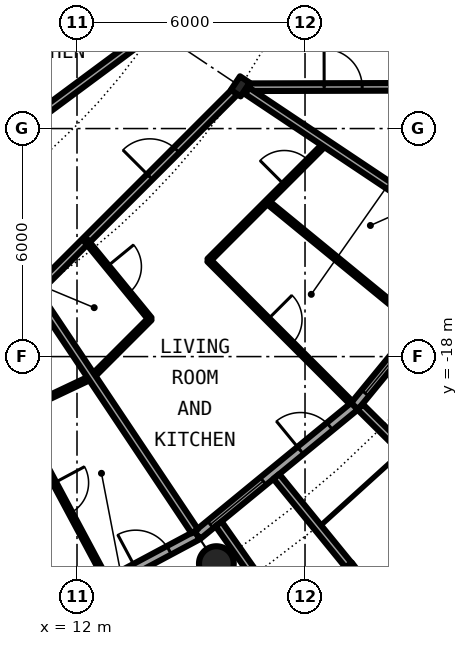
"""IFC4 building model, lengths in metres.
Left out: names, types, materials, properties, quantities, classifications, styles, units other than length and angle.
Written with IfcOpenShell. Run it as: python <this file> out.ifc"""

import sys

from ifc_helpers import new_model, si_unit, direction, frame, frame_2d, origin, origin_2d, place, context, subcontext, project, spatial, rectangle, circle, hollow_circle, i_section, extrude, element, fill, save


model = new_model("IFC4")
c1 = context("Model", 3, precision=1e-05, world=origin(), true_north=direction((0.0, 1.0)))
c2 = subcontext(c1, "Body", "Model", "MODEL_VIEW")
j1 = project(units=[si_unit("LENGTHUNIT", "METRE"), si_unit("PLANEANGLEUNIT", "RADIAN")], contexts=[c1])
p1 = place(None, origin())
s1 = spatial("IfcSite", under=j1, at=p1, CompositionType="ELEMENT")
p2 = place(p1, origin())
s2 = spatial("IfcBuilding", under=s1, at=p2, CompositionType="ELEMENT")
p3 = place(p2, frame((0.0, 0.0, 117.75)))
s3 = spatial("IfcBuildingStorey", under=s2, at=p3, CompositionType="ELEMENT", Elevation=117.75)
p4 = place(p3, frame((15.667, -23.448, 0.0), z_axis=(0.0, 0.0, 1.0), x_axis=(1.0, 0.0, 0.0)))
e1 = element("IfcColumn", 1, at=p4, inside=s3, PredefinedType="COLUMN", context=c2, shape_type="SweptSolid", body=[
    extrude(hollow_circle(Radius=0.457, WallThickness=0.04, at=origin_2d()), origin(), (0.0, 0.0, 1.0), 3.05),
])
p5 = place(p3, frame((16.297, -10.889, 0.0), z_axis=(0.0, 0.0, 1.0), x_axis=(0.831469612303, -0.55557023302, 0.0)))
e2 = element("IfcColumn", 2, at=p5, inside=s3, PredefinedType="COLUMN", context=c2, shape_type="SweptSolid", body=[
    extrude(i_section(OverallWidth=0.307, OverallDepth=0.432, WebThickness=0.021, FlangeThickness=0.04, FilletRadius=0.027, at=origin_2d()), origin(), (0.0, 0.0, 1.0), 3.05),
])
p6 = place(p3, frame((10.447, -25.222, 0.0), z_axis=(0.0, 0.0, 1.0), x_axis=(0.881915646801, 0.471407246368, 0.0)))
e3 = element("IfcWall", 3, at=p6, inside=s3, PredefinedType="SOLIDWALL", context=c2, shape_type="SweptSolid", body=[
    extrude(rectangle(XDim=5.352, YDim=0.25, at=frame_2d((2.676, 0.0))), origin(), (0.0, 0.0, 1.0), 2.7),
])
p7 = place(p6, frame((0.441, 0.0, 0.3)))
e4 = element("IfcOpeningElement", 4, at=p7, cuts=e3, PredefinedType="OPENING", context=c2, shape_type="SweptSolid", body=[
    extrude(rectangle(XDim=1.8, YDim=2.1, at=frame_2d((0.9, 1.05))), frame((0.0, 0.135, 0.0), z_axis=(0.0, -1.0, 0.0), x_axis=(1.0, 0.0, 0.0)), (0.0, 0.0, 1.0), 0.27),
])
p8 = place(p6, frame((3.51, 0.0, 0.0)))
e5 = element("IfcOpeningElement", 5, at=p8, cuts=e3, PredefinedType="OPENING", context=c2, shape_type="SweptSolid", body=[
    extrude(rectangle(XDim=1.0, YDim=2.2, at=frame_2d((0.5, 1.1))), frame((0.0, 0.135, 0.0), z_axis=(0.0, -1.0, 0.0), x_axis=(1.0, 0.0, 0.0)), (0.0, 0.0, 1.0), 0.27),
])
p9 = place(p3, frame((15.167, -22.699, 0.0), z_axis=(0.0, 0.0, 1.0), x_axis=(0.773019449054, 0.634382322723, 0.0)))
e6 = element("IfcWall", 6, at=p9, inside=s3, PredefinedType="SOLIDWALL", context=c2, shape_type="SweptSolid", body=[
    extrude(rectangle(XDim=5.352, YDim=0.25, at=frame_2d((2.676, 0.0))), origin(), (0.0, 0.0, 1.0), 2.7),
])
p10 = place(p9, frame((0.441, 0.0, 0.3)))
e7 = element("IfcOpeningElement", 7, at=p10, cuts=e6, PredefinedType="OPENING", context=c2, shape_type="SweptSolid", body=[
    extrude(rectangle(XDim=1.8, YDim=2.1, at=frame_2d((0.9, 1.05))), frame((0.0, 0.135, 0.0), z_axis=(0.0, -1.0, 0.0), x_axis=(1.0, 0.0, 0.0)), (0.0, 0.0, 1.0), 0.27),
])
p11 = place(p9, frame((3.51, 0.0, 0.0)))
e8 = element("IfcOpeningElement", 8, at=p11, cuts=e6, PredefinedType="OPENING", context=c2, shape_type="SweptSolid", body=[
    extrude(rectangle(XDim=1.0, YDim=2.2, at=frame_2d((0.5, 1.1))), frame((0.0, 0.135, 0.0), z_axis=(0.0, -1.0, 0.0), x_axis=(1.0, 0.0, 0.0)), (0.0, 0.0, 1.0), 0.27),
])
p12 = place(p3, frame((17.382, -24.94, -0.03), z_axis=(0.0, 0.0, 1.0), x_axis=(0.797456837111, 0.603375996329, 0.0)))
e9 = element("IfcWall", 9, at=p12, inside=s3, PredefinedType="SOLIDWALL", context=c2, shape_type="SweptSolid", body=[
    extrude(rectangle(XDim=2.391, YDim=0.2, at=frame_2d((1.196, 0.0))), origin(), (0.0, 0.0, 1.0), 2.73),
])
p13 = place(p12, frame((0.156, 0.0, 0.33)))
e10 = element("IfcOpeningElement", 10, at=p13, cuts=e9, PredefinedType="OPENING", context=c2, shape_type="SweptSolid", body=[
    extrude(circle(Radius=1.04, at=frame_2d((1.04, 1.04))), frame((0.0, 0.11, 0.0), z_axis=(0.0, -1.0, 0.0), x_axis=(1.0, 0.0, 0.0)), (0.0, 0.0, 1.0), 0.22),
])
p14 = place(p3, frame((15.726, -22.402, -0.03), z_axis=(0.0, 0.0, 1.0), x_axis=(0.574826383135, -0.818275399393, 0.0)))
e11 = element("IfcWall", 11, at=p14, inside=s3, PredefinedType="SOLIDWALL", context=c2, shape_type="SweptSolid", body=[
    extrude(rectangle(XDim=2.929, YDim=0.2, at=frame_2d((1.465, 0.0))), origin(), (0.0, 0.0, 1.0), 2.73),
])
p15 = place(p3, frame((17.246, -21.155, -0.03), z_axis=(0.0, 0.0, 1.0), x_axis=(0.631741648902, -0.775179004516, 0.0)))
e12 = element("IfcWall", 12, at=p15, inside=s3, PredefinedType="SOLIDWALL", context=c2, shape_type="SweptSolid", body=[
    extrude(rectangle(XDim=3.006, YDim=0.2, at=frame_2d((1.503, 0.0))), origin(), (0.0, 0.0, 1.0), 2.73),
])
p16 = place(p3, frame((19.304, -19.304, 0.0), z_axis=(0.0, 0.0, 1.0), x_axis=(0.634382322723, 0.773019449054, 0.0)))
e13 = element("IfcWall", 13, at=p16, inside=s3, PredefinedType="SOLIDWALL", context=c2, shape_type="SweptSolid", body=[
    extrude(rectangle(XDim=5.352, YDim=0.25, at=frame_2d((2.676, 0.0))), origin(), (0.0, 0.0, 1.0), 2.7),
])
p17 = place(p16, frame((0.441, 0.0, 0.3)))
e14 = element("IfcOpeningElement", 14, at=p17, cuts=e13, PredefinedType="OPENING", context=c2, shape_type="SweptSolid", body=[
    extrude(rectangle(XDim=1.8, YDim=2.1, at=frame_2d((0.9, 1.05))), frame((0.0, 0.135, 0.0), z_axis=(0.0, -1.0, 0.0), x_axis=(1.0, 0.0, 0.0)), (0.0, 0.0, 1.0), 0.27),
])
p18 = place(p16, frame((3.51, 0.0, 0.0)))
e15 = element("IfcOpeningElement", 15, at=p18, cuts=e13, PredefinedType="OPENING", context=c2, shape_type="SweptSolid", body=[
    extrude(rectangle(XDim=1.0, YDim=2.2, at=frame_2d((0.5, 1.1))), frame((0.0, 0.135, 0.0), z_axis=(0.0, -1.0, 0.0), x_axis=(1.0, 0.0, 0.0)), (0.0, 0.0, 1.0), 0.27),
])
p19 = place(p3, frame((19.45, -19.323, -0.03), z_axis=(0.0, 0.0, 1.0), x_axis=(0.709727076896, -0.704476739375, 0.0)))
e16 = element("IfcWall", 16, at=p19, inside=s3, PredefinedType="SOLIDWALL", context=c2, shape_type="SweptSolid", body=[
    extrude(rectangle(XDim=2.883, YDim=0.2, at=frame_2d((1.441, 0.0))), origin(), (0.0, 0.0, 1.0), 2.73),
])
p20 = place(p3, frame((10.425, -19.47, 0.0), z_axis=(0.0, 0.0, 1.0), x_axis=(0.903951937529, 0.427634066274, 0.0)))
e17 = element("IfcWall", 17, at=p20, inside=s3, PredefinedType="PARTITIONING", context=c2, shape_type="SweptSolid", body=[
    extrude(rectangle(XDim=2.181, YDim=0.1, at=frame_2d((1.091, 0.0))), origin(), (0.0, 0.0, 1.0), 2.7),
])
p21 = place(p3, frame((12.389, -18.542, 0.0), z_axis=(0.0, 0.0, 1.0), x_axis=(0.707106781187, 0.707106781187, 0.0)))
e18 = element("IfcWall", 18, at=p21, inside=s3, PredefinedType="PARTITIONING", context=c2, shape_type="SweptSolid", body=[
    extrude(rectangle(XDim=2.175, YDim=0.1, at=frame_2d((1.088, 0.0))), origin(), (0.0, 0.0, 1.0), 2.7),
])
p22 = place(p3, frame((15.468, -15.463, 0.0), z_axis=(0.0, 0.0, 1.0), x_axis=(0.707106781187, 0.707106781187, 0.0)))
e19 = element("IfcWall", 19, at=p22, inside=s3, PredefinedType="PARTITIONING", context=c2, shape_type="SweptSolid", body=[
    extrude(rectangle(XDim=4.351, YDim=0.1, at=frame_2d((2.176, 0.0))), origin(), (0.0, 0.0, 1.0), 2.7),
])
p23 = place(p22, frame((2.808, 0.0, 0.0)))
e20 = element("IfcOpeningElement", 20, at=p23, cuts=e19, PredefinedType="OPENING", context=c2, shape_type="SweptSolid", body=[
    extrude(rectangle(XDim=0.9, YDim=2.3, at=frame_2d((0.45, 1.15))), frame((0.0, 0.06, 0.0), z_axis=(0.0, -1.0, 0.0), x_axis=(1.0, 0.0, 0.0)), (0.0, 0.0, 1.0), 0.12),
])
p24 = place(p3, frame((11.0, -16.186, 0.0), z_axis=(0.0, 0.0, 1.0), x_axis=(0.707106781187, 0.707106781187, 0.0)))
e21 = element("IfcWall", 21, at=p24, inside=s3, PredefinedType="PARTITIONING", context=c2, shape_type="SweptSolid", body=[
    extrude(rectangle(XDim=7.334, YDim=0.2, at=frame_2d((3.667, 0.0))), origin(), (0.0, 0.0, 1.0), 2.39),
])
p25 = place(p24, frame((4.123, 0.0, 0.0)))
e22 = element("IfcOpeningElement", 22, at=p25, cuts=e21, PredefinedType="OPENING", context=c2, shape_type="SweptSolid", body=[
    extrude(rectangle(XDim=1.0, YDim=2.3, at=frame_2d((0.5, 1.15))), frame((0.0, 0.11, 0.0), z_axis=(0.0, -1.0, 0.0), x_axis=(1.0, 0.0, 0.0)), (0.0, 0.0, 1.0), 0.22),
])
p26 = place(p3, frame((4.906, -16.172, 0.0), z_axis=(0.0, 0.0, 1.0), x_axis=(0.803204584823, 0.59570327758, 0.0)))
e23 = element("IfcWall", 23, at=p26, inside=s3, PredefinedType="PARTITIONING", context=c2, shape_type="SweptSolid", body=[
    extrude(rectangle(XDim=11.387, YDim=0.2, at=frame_2d((5.693, 0.0))), origin(), (0.0, 0.0, 1.0), 2.7),
])
p27 = place(p26, frame((4.38, 0.0, 0.0)))
e24 = element("IfcOpeningElement", 24, at=p27, cuts=e23, PredefinedType="OPENING", context=c2, shape_type="SweptSolid", body=[
    extrude(rectangle(XDim=1.0, YDim=2.3, at=frame_2d((0.5, 1.15))), frame((0.0, 0.11, 0.0), z_axis=(0.0, -1.0, 0.0), x_axis=(1.0, 0.0, 0.0)), (0.0, 0.0, 1.0), 0.22),
])
p28 = place(p3, frame((16.541, -10.912, 0.0), z_axis=(0.0, 0.0, 1.0), x_axis=(0.999997173357, 0.002377662213, 0.0)))
e25 = element("IfcWall", 25, at=p28, inside=s3, PredefinedType="PARTITIONING", context=c2, shape_type="SweptSolid", body=[
    extrude(rectangle(XDim=5.134, YDim=0.2, at=frame_2d((2.567, 0.0))), origin(), (0.0, 0.0, 1.0), 2.7),
])
p29 = place(p28, frame((1.963, 0.0, 0.0)))
e26 = element("IfcOpeningElement", 26, at=p29, cuts=e25, PredefinedType="OPENING", context=c2, shape_type="SweptSolid", body=[
    extrude(rectangle(XDim=1.0, YDim=2.3, at=frame_2d((0.5, 1.15))), frame((0.0, 0.11, 0.0), z_axis=(0.0, -1.0, 0.0), x_axis=(1.0, 0.0, 0.0)), (0.0, 0.0, 1.0), 0.22),
])
p30 = place(p3, frame((10.417, -19.474, 0.0), z_axis=(0.0, 0.0, 1.0), x_axis=(0.471755462896, -0.881729427448, 0.0)))
e27 = element("IfcWall", 27, at=p30, inside=s3, PredefinedType="PARTITIONING", context=c2, shape_type="SweptSolid", body=[
    extrude(rectangle(XDim=5.09, YDim=0.1, at=frame_2d((2.545, 0.0))), origin(), (0.0, 0.0, 1.0), 2.7),
])
p31 = place(p30, frame((2.095, 0.0, 0.0)))
e28 = element("IfcOpeningElement", 28, at=p31, cuts=e27, PredefinedType="OPENING", context=c2, shape_type="SweptSolid", body=[
    extrude(rectangle(XDim=0.9, YDim=2.3, at=frame_2d((0.45, 1.15))), frame((0.0, 0.06, 0.0), z_axis=(0.0, -1.0, 0.0), x_axis=(1.0, 0.0, 0.0)), (0.0, 0.0, 1.0), 0.12),
])
p32 = place(p3, frame((11.009, -16.477, 0.0), z_axis=(0.0, 0.0, 1.0), x_axis=(0.555664536482, -0.831406593008, 0.0)))
e29 = element("IfcWall", 29, at=p32, inside=s3, PredefinedType="PARTITIONING", context=c2, shape_type="SweptSolid", body=[
    extrude(rectangle(XDim=7.358, YDim=0.2, at=frame_2d((3.679, 0.0))), origin(), (0.0, 0.0, 1.0), 2.7),
])
p33 = place(p3, frame((12.237, -14.948, 0.0), z_axis=(0.0, 0.0, 1.0), x_axis=(0.633537478353, -0.773712002958, 0.0)))
e30 = element("IfcWall", 30, at=p33, inside=s3, PredefinedType="PARTITIONING", context=c2, shape_type="SweptSolid", body=[
    extrude(rectangle(XDim=2.661, YDim=0.1, at=frame_2d((1.331, 0.0))), origin(), (0.0, 0.0, 1.0), 2.7),
])
p34 = place(p33, frame((0.881, 0.0, 0.0)))
e31 = element("IfcOpeningElement", 31, at=p34, cuts=e30, PredefinedType="OPENING", context=c2, shape_type="SweptSolid", body=[
    extrude(rectangle(XDim=0.9, YDim=2.3, at=frame_2d((0.45, 1.15))), frame((0.0, 0.06, 0.0), z_axis=(0.0, -1.0, 0.0), x_axis=(1.0, 0.0, 0.0)), (0.0, 0.0, 1.0), 0.12),
])
p35 = place(p3, frame((15.465, -15.465, 0.0), z_axis=(0.0, 0.0, 1.0), x_axis=(0.707106781187, -0.707106781187, 0.0)))
e32 = element("IfcWall", 32, at=p35, inside=s3, PredefinedType="PARTITIONING", context=c2, shape_type="SweptSolid", body=[
    extrude(rectangle(XDim=5.305, YDim=0.1, at=frame_2d((2.652, 0.0))), origin(), (0.0, 0.0, 1.0), 2.7),
])
p36 = place(p35, frame((2.202, 0.0, 0.0)))
e33 = element("IfcOpeningElement", 33, at=p36, cuts=e32, PredefinedType="OPENING", context=c2, shape_type="SweptSolid", body=[
    extrude(rectangle(XDim=0.9, YDim=2.3, at=frame_2d((0.45, 1.15))), frame((0.0, 0.06, 0.0), z_axis=(0.0, -1.0, 0.0), x_axis=(1.0, 0.0, 0.0)), (0.0, 0.0, 1.0), 0.12),
])
p37 = place(p3, frame((16.477, -11.009, 0.0), z_axis=(0.0, 0.0, 1.0), x_axis=(0.831467903109, -0.555572791, 0.0)))
e34 = element("IfcWall", 34, at=p37, inside=s3, PredefinedType="PARTITIONING", context=c2, shape_type="SweptSolid", body=[
    extrude(rectangle(XDim=7.358, YDim=0.2, at=frame_2d((3.679, 0.0))), origin(), (0.0, 0.0, 1.0), 2.7),
])
p38 = place(p3, frame((17.004, -13.927, 0.0), z_axis=(0.0, 0.0, 1.0), x_axis=(0.773517471898, -0.633774976367, 0.0)))
e35 = element("IfcWall", 35, at=p38, inside=s3, PredefinedType="PARTITIONING", context=c2, shape_type="SweptSolid", body=[
    extrude(rectangle(XDim=5.196, YDim=0.1, at=frame_2d((2.598, 0.0))), origin(), (0.0, 0.0, 1.0), 2.7),
])
p39 = place(p8, origin())
e36 = element("IfcDoor", 36, at=p39, inside=s3, OperationType="SINGLE_SWING_LEFT", PredefinedType="DOOR", context=c2, shape_type="SweptSolid", body=[
    extrude(rectangle(XDim=1.0, YDim=2.2, at=frame_2d((0.5, 1.1))), frame((0.0, 0.025, 0.0), z_axis=(0.0, -1.0, 0.0), x_axis=(1.0, 0.0, 0.0)), (0.0, 0.0, 1.0), 0.05),
])
fill(e5, e36)
p40 = place(p10, origin())
e37 = element("IfcWindow", 37, at=p40, inside=s3, PartitioningType="SINGLE_PANEL", PredefinedType="WINDOW", context=c2, shape_type="SweptSolid", body=[
    extrude(rectangle(XDim=1.8, YDim=2.1, at=frame_2d((0.9, 1.05))), frame((0.0, 0.03, 0.0), z_axis=(0.0, -1.0, 0.0), x_axis=(1.0, 0.0, 0.0)), (0.0, 0.0, 1.0), 0.06),
])
fill(e7, e37)
p41 = place(p11, origin())
e38 = element("IfcDoor", 38, at=p41, inside=s3, OperationType="SINGLE_SWING_LEFT", PredefinedType="DOOR", context=c2, shape_type="SweptSolid", body=[
    extrude(rectangle(XDim=1.0, YDim=2.2, at=frame_2d((0.5, 1.1))), frame((0.0, 0.025, 0.0), z_axis=(0.0, -1.0, 0.0), x_axis=(1.0, 0.0, 0.0)), (0.0, 0.0, 1.0), 0.05),
])
fill(e8, e38)
p42 = place(p17, origin())
e39 = element("IfcWindow", 39, at=p42, inside=s3, PartitioningType="SINGLE_PANEL", PredefinedType="WINDOW", context=c2, shape_type="SweptSolid", body=[
    extrude(rectangle(XDim=1.8, YDim=2.1, at=frame_2d((0.9, 1.05))), frame((0.0, 0.03, 0.0), z_axis=(0.0, -1.0, 0.0), x_axis=(1.0, 0.0, 0.0)), (0.0, 0.0, 1.0), 0.06),
])
fill(e14, e39)
p43 = place(p31, origin())
e40 = element("IfcDoor", 40, at=p43, inside=s3, OperationType="SINGLE_SWING_LEFT", PredefinedType="DOOR", context=c2, shape_type="SweptSolid", body=[
    extrude(rectangle(XDim=0.9, YDim=2.3, at=frame_2d((0.45, 1.15))), frame((0.0, 0.025, 0.0), z_axis=(0.0, -1.0, 0.0), x_axis=(1.0, 0.0, 0.0)), (0.0, 0.0, 1.0), 0.05),
])
fill(e28, e40)
p44 = place(p25, origin())
e41 = element("IfcDoor", 41, at=p44, inside=s3, OperationType="SINGLE_SWING_RIGHT", PredefinedType="DOOR", context=c2, shape_type="SweptSolid", body=[
    extrude(rectangle(XDim=1.0, YDim=2.3, at=frame_2d((0.5, 1.15))), frame((0.0, 0.025, 0.0), z_axis=(0.0, -1.0, 0.0), x_axis=(1.0, 0.0, 0.0)), (0.0, 0.0, 1.0), 0.05),
])
fill(e22, e41)
p45 = place(p34, origin())
e42 = element("IfcDoor", 42, at=p45, inside=s3, OperationType="SINGLE_SWING_RIGHT", PredefinedType="DOOR", context=c2, shape_type="SweptSolid", body=[
    extrude(rectangle(XDim=0.9, YDim=2.3, at=frame_2d((0.45, 1.15))), frame((0.0, 0.025, 0.0), z_axis=(0.0, -1.0, 0.0), x_axis=(1.0, 0.0, 0.0)), (0.0, 0.0, 1.0), 0.05),
])
fill(e31, e42)
p46 = place(p36, origin())
e43 = element("IfcDoor", 43, at=p46, inside=s3, OperationType="SINGLE_SWING_RIGHT", PredefinedType="DOOR", context=c2, shape_type="SweptSolid", body=[
    extrude(rectangle(XDim=0.9, YDim=2.3, at=frame_2d((0.45, 1.15))), frame((0.0, 0.025, 0.0), z_axis=(0.0, -1.0, 0.0), x_axis=(1.0, 0.0, 0.0)), (0.0, 0.0, 1.0), 0.05),
])
fill(e33, e43)
p47 = place(p23, origin())
e44 = element("IfcDoor", 44, at=p47, inside=s3, OperationType="SINGLE_SWING_RIGHT", PredefinedType="DOOR", context=c2, shape_type="SweptSolid", body=[
    extrude(rectangle(XDim=0.9, YDim=2.3, at=frame_2d((0.45, 1.15))), frame((0.0, 0.025, 0.0), z_axis=(0.0, -1.0, 0.0), x_axis=(1.0, 0.0, 0.0)), (0.0, 0.0, 1.0), 0.05),
])
fill(e20, e44)
p48 = place(p29, origin())
e45 = element("IfcDoor", 45, at=p48, inside=s3, OperationType="SINGLE_SWING_LEFT", PredefinedType="DOOR", context=c2, shape_type="SweptSolid", body=[
    extrude(rectangle(XDim=1.0, YDim=2.3, at=frame_2d((0.5, 1.15))), frame((0.0, 0.025, 0.0), z_axis=(0.0, -1.0, 0.0), x_axis=(1.0, 0.0, 0.0)), (0.0, 0.0, 1.0), 0.05),
])
fill(e26, e45)
save(model, sys.argv[1])
